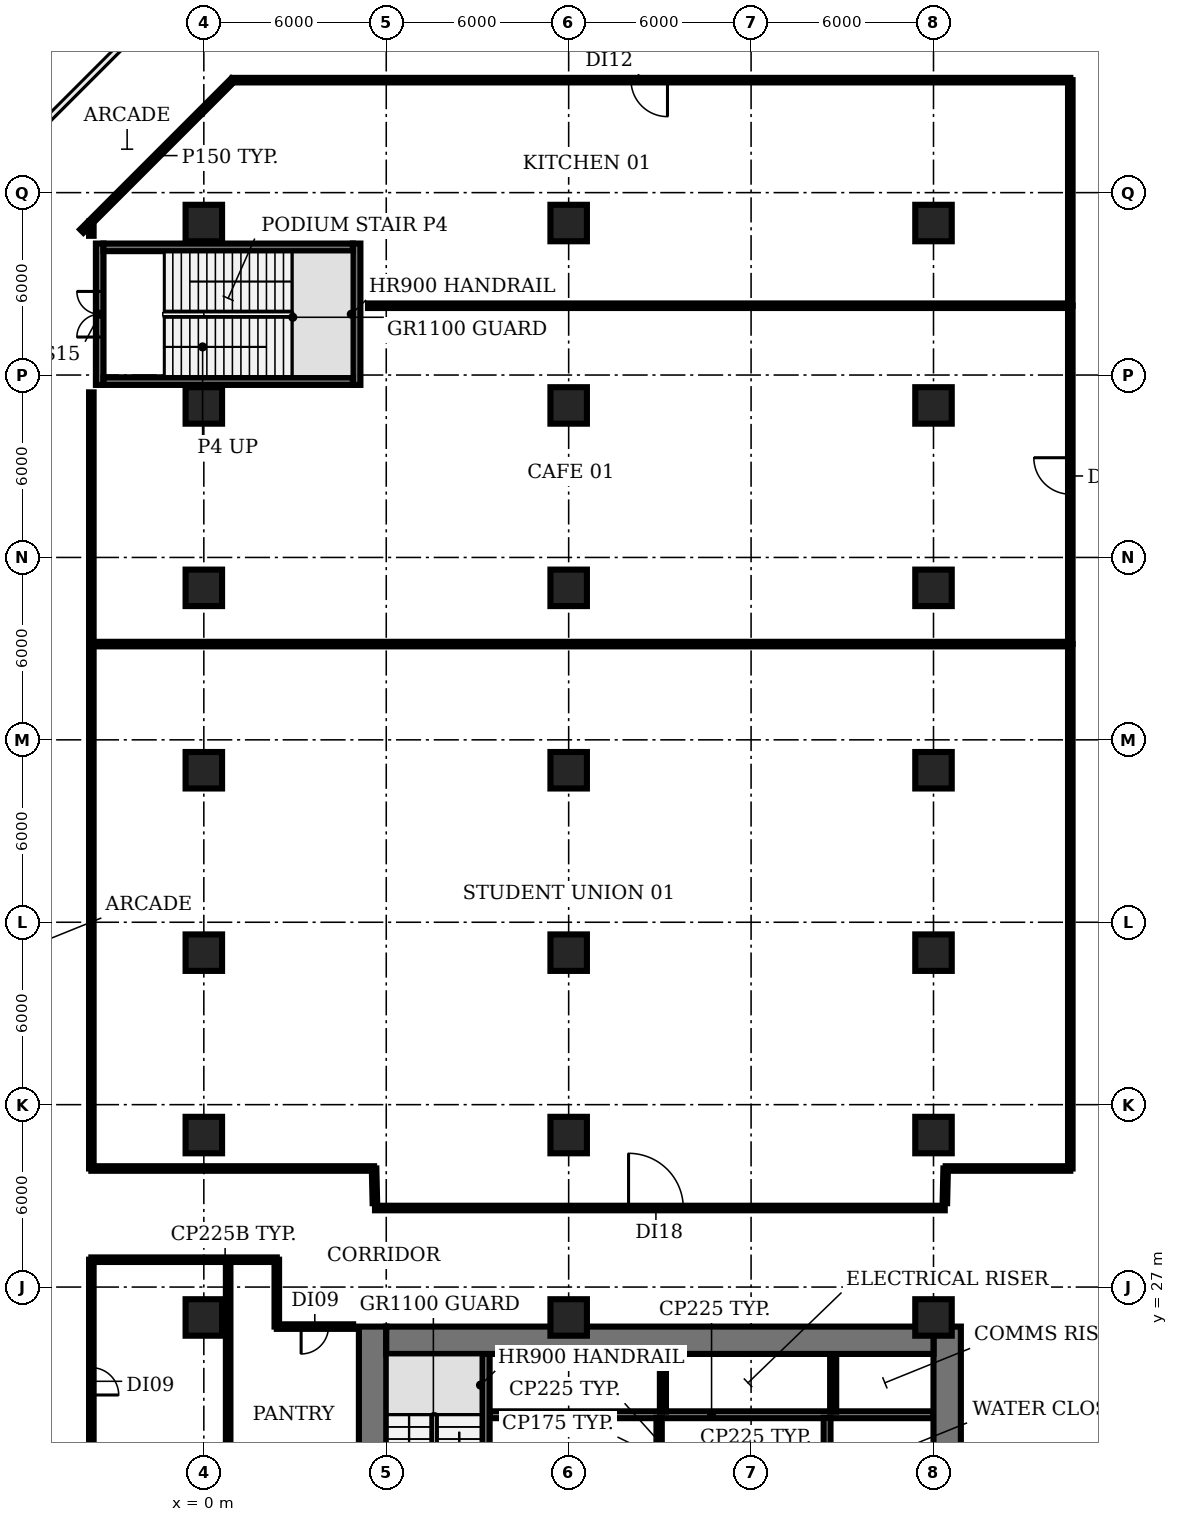
"""IFC4 building model, lengths in metres.
Left out: names, types, materials, properties, quantities, classifications, styles, units other than length and angle.
Written with IfcOpenShell. Run it as: python <this file> out.ifc"""

import sys

from ifc_helpers import new_model, si_unit, direction, frame, frame_2d, origin, origin_2d, place, context, subcontext, project, spatial, rectangle, extrude, element, fill, save


model = new_model("IFC4")
c1 = context("Model", 3, precision=1e-05, world=origin(), true_north=direction((0.0, 1.0)))
c2 = subcontext(c1, "Body", "Model", "MODEL_VIEW")
j1 = project(units=[si_unit("LENGTHUNIT", "METRE"), si_unit("PLANEANGLEUNIT", "RADIAN")], contexts=[c1])
p1 = place(None, origin())
s1 = spatial("IfcSite", under=j1, at=p1, CompositionType="ELEMENT")
p2 = place(p1, origin())
s2 = spatial("IfcBuilding", under=s1, at=p2, CompositionType="ELEMENT")
p3 = place(p2, origin())
s3 = spatial("IfcBuildingStorey", under=s2, at=p3, CompositionType="ELEMENT", Elevation=0.0)
for number, where, z_axis, x_axis in (
    (1, (0.0, 26.0, 0.0), (0.0, 0.0, 1.0), (1.0, 0.0, 0.0)),
    (2, (0.0, 32.0, 0.0), (0.0, 0.0, 1.0), (1.0, 0.0, 0.0)),
    (3, (0.0, 38.0, 0.0), (0.0, 0.0, 1.0), (1.0, 0.0, 0.0)),
    (4, (0.0, 44.0, 0.0), (0.0, 0.0, 1.0), (1.0, 0.0, 0.0)),
    (5, (0.0, 50.0, 0.0), (0.0, 0.0, 1.0), (1.0, 0.0, 0.0)),
    (6, (0.0, 56.0, 0.0), (0.0, 0.0, 1.0), (1.0, 0.0, 0.0)),
    (7, (0.0, 62.0, 0.0), (0.0, 0.0, 1.0), (1.0, 0.0, 0.0)),
    (8, (12.0, 26.0, 0.0), (0.0, 0.0, 1.0), (1.0, 0.0, 0.0)),
    (9, (12.0, 32.0, 0.0), (0.0, 0.0, 1.0), (1.0, 0.0, 0.0)),
    (10, (12.0, 38.0, 0.0), (0.0, 0.0, 1.0), (1.0, 0.0, 0.0)),
    (11, (12.0, 44.0, 0.0), (0.0, 0.0, 1.0), (1.0, 0.0, 0.0)),
    (12, (12.0, 50.0, 0.0), (0.0, 0.0, 1.0), (1.0, 0.0, 0.0)),
    (13, (12.0, 56.0, 0.0), (0.0, 0.0, 1.0), (1.0, 0.0, 0.0)),
    (14, (12.0, 62.0, 0.0), (0.0, 0.0, 1.0), (1.0, 0.0, 0.0)),
    (15, (24.0, 26.0, 0.0), (0.0, 0.0, 1.0), (1.0, 0.0, 0.0)),
    (16, (24.0, 32.0, 0.0), (0.0, 0.0, 1.0), (1.0, 0.0, 0.0)),
    (17, (24.0, 38.0, 0.0), (0.0, 0.0, 1.0), (1.0, 0.0, 0.0)),
    (18, (24.0, 44.0, 0.0), (0.0, 0.0, 1.0), (1.0, 0.0, 0.0)),
    (19, (24.0, 50.0, 0.0), (0.0, 0.0, 1.0), (1.0, 0.0, 0.0)),
    (20, (24.0, 56.0, 0.0), (0.0, 0.0, 1.0), (1.0, 0.0, 0.0)),
    (21, (24.0, 62.0, 0.0), (0.0, 0.0, 1.0), (1.0, 0.0, 0.0)),
):
    element("IfcColumn", number, at=place(p3, frame(where, z_axis=z_axis, x_axis=x_axis)), inside=s3, PredefinedType="COLUMN", context=c2, shape_type="SweptSolid", body=[
        extrude(rectangle(XDim=1.2, YDim=1.2, at=origin_2d()), origin(), (0.0, 0.0, 1.0), 5.65),
    ])
p4 = place(p3, frame((9.4, 22.8, 0.0), z_axis=(0.0, 0.0, 1.0), x_axis=(1.0, 0.0, 0.0)))
e22 = element("IfcWall", 22, at=p4, inside=s3, PredefinedType="PARTITIONING", context=c2, shape_type="SweptSolid", body=[
    extrude(rectangle(XDim=14.6, YDim=0.225, at=frame_2d((7.3, 0.0))), origin(), (0.0, 0.0, 1.0), 5.65),
])
p5 = place(p3, frame((9.275, 18.375, 0.0), z_axis=(0.0, 0.0, 1.0), x_axis=(0.0, 1.0, 0.0)))
e23 = element("IfcWall", 23, at=p5, inside=s3, PredefinedType="SHEAR", context=c2, shape_type="SweptSolid", body=[
    extrude(rectangle(XDim=6.425, YDim=0.25, at=frame_2d((3.212, 0.0))), origin(), (0.0, 0.0, 1.0), 5.65),
])
p6 = place(p3, frame((14.975, 20.1, 0.0), z_axis=(0.0, 0.0, 1.0), x_axis=(0.0, 1.0, 0.0)))
e24 = element("IfcWall", 24, at=p6, inside=s3, PredefinedType="PARTITIONING", context=c2, shape_type="SweptSolid", body=[
    extrude(rectangle(XDim=2.6, YDim=0.175, at=frame_2d((1.3, 0.0))), origin(), (0.0, 0.0, 1.0), 5.65),
])
p7 = place(p3, frame((15.1, 22.9, 0.0), z_axis=(0.0, 0.0, 1.0), x_axis=(0.0, 1.0, 0.0)))
e25 = element("IfcWall", 25, at=p7, inside=s3, PredefinedType="SHEAR", context=c2, shape_type="SweptSolid", body=[
    extrude(rectangle(XDim=1.9, YDim=0.2, at=frame_2d((0.95, 0.0))), origin(), (0.0, 0.0, 1.0), 5.65),
])
p8 = place(p3, frame((20.5, 20.1, 0.0), z_axis=(0.0, 0.0, 1.0), x_axis=(0.0, 1.0, 0.0)))
e26 = element("IfcWall", 26, at=p8, inside=s3, PredefinedType="PARTITIONING", context=c2, shape_type="SweptSolid", body=[
    extrude(rectangle(XDim=2.6, YDim=0.225, at=frame_2d((1.3, 0.0))), origin(), (0.0, 0.0, 1.0), 5.65),
])
p9 = place(p3, frame((20.7, 22.9, 0.0), z_axis=(0.0, 0.0, 1.0), x_axis=(0.0, 1.0, 0.0)))
e27 = element("IfcWall", 27, at=p9, inside=s3, PredefinedType="SHEAR", context=c2, shape_type="SweptSolid", body=[
    extrude(rectangle(XDim=1.9, YDim=0.2, at=frame_2d((0.95, 0.0))), origin(), (0.0, 0.0, 1.0), 5.65),
])
p10 = place(p3, frame((5.55, 4.5, 0.0), z_axis=(0.0, 0.0, 1.0), x_axis=(0.0, 1.0, 0.0)))
e28 = element("IfcWall", 28, at=p10, inside=s3, PredefinedType="SHEAR", context=c2, shape_type="SweptSolid", body=[
    extrude(rectangle(XDim=21.2, YDim=0.9, at=frame_2d((10.6, 0.0))), origin(), (0.0, 0.0, 1.0), 5.65),
])
p11 = place(p10, frame((7.6, 0.0, 0.0)))
e29 = element("IfcOpeningElement", 29, at=p11, cuts=e28, PredefinedType="OPENING", context=c2, shape_type="SweptSolid", body=[
    extrude(rectangle(XDim=1.2, YDim=2.1, at=frame_2d((0.6, 1.05))), frame((0.0, 0.46, 0.0), z_axis=(0.0, -1.0, 0.0), x_axis=(1.0, 0.0, 0.0)), (0.0, 0.0, 1.0), 0.92),
])
p12 = place(p10, frame((14.15, 0.0, 0.0)))
e30 = element("IfcOpeningElement", 30, at=p12, cuts=e28, PredefinedType="OPENING", context=c2, shape_type="SweptSolid", body=[
    extrude(rectangle(XDim=1.2, YDim=2.1, at=frame_2d((0.6, 1.05))), frame((0.0, 0.46, 0.0), z_axis=(0.0, -1.0, 0.0), x_axis=(1.0, 0.0, 0.0)), (0.0, 0.0, 1.0), 0.92),
])
p13 = place(p3, frame((24.45, 25.7, 0.0), z_axis=(0.0, 0.0, 1.0), x_axis=(0.0, -1.0, 0.0)))
e31 = element("IfcWall", 31, at=p13, inside=s3, PredefinedType="SHEAR", context=c2, shape_type="SweptSolid", body=[
    extrude(rectangle(XDim=21.2, YDim=0.9, at=frame_2d((10.6, 0.0))), origin(), (0.0, 0.0, 1.0), 5.65),
])
p14 = place(p13, frame((12.45, 0.0, 0.0)))
e32 = element("IfcOpeningElement", 32, at=p14, cuts=e31, PredefinedType="OPENING", context=c2, shape_type="SweptSolid", body=[
    extrude(rectangle(XDim=0.9, YDim=2.1, at=frame_2d((0.45, 1.05))), frame((0.0, 0.46, 0.0), z_axis=(0.0, -1.0, 0.0), x_axis=(1.0, 0.0, 0.0)), (0.0, 0.0, 1.0), 0.92),
])
p15 = place(p13, frame((6.45, 0.0, 0.0)))
e33 = element("IfcOpeningElement", 33, at=p15, cuts=e31, PredefinedType="OPENING", context=c2, shape_type="SweptSolid", body=[
    extrude(rectangle(XDim=2.0, YDim=2.1, at=frame_2d((1.0, 1.05))), frame((0.0, 0.46, 0.0), z_axis=(0.0, -1.0, 0.0), x_axis=(1.0, 0.0, 0.0)), (0.0, 0.0, 1.0), 0.92),
])
p16 = place(p3, frame((6.0, 25.25, 0.0), z_axis=(0.0, 0.0, 1.0), x_axis=(1.0, 0.0, 0.0)))
e34 = element("IfcWall", 34, at=p16, inside=s3, PredefinedType="SHEAR", context=c2, shape_type="SweptSolid", body=[
    extrude(rectangle(XDim=18.0, YDim=0.9, at=frame_2d((9.0, 0.0))), origin(), (0.0, 0.0, 1.0), 5.65),
])
p17 = place(p3, frame((-3.425, 56.675, 0.0), z_axis=(0.0, 0.0, 1.0), x_axis=(0.0, 1.0, 0.0)))
e35 = element("IfcWall", 35, at=p17, inside=s3, PredefinedType="SHEAR", context=c2, shape_type="SweptSolid", body=[
    extrude(rectangle(XDim=4.65, YDim=0.25, at=frame_2d((2.325, 0.0))), origin(), (0.0, 0.0, 1.0), 5.65),
])
p18 = place(p17, frame((1.575, 0.0, 0.0)))
e36 = element("IfcOpeningElement", 36, at=p18, cuts=e35, PredefinedType="OPENING", context=c2, shape_type="SweptSolid", body=[
    extrude(rectangle(XDim=1.5, YDim=2.1, at=frame_2d((0.75, 1.05))), frame((0.0, 0.135, 0.0), z_axis=(0.0, -1.0, 0.0), x_axis=(1.0, 0.0, 0.0)), (0.0, 0.0, 1.0), 0.27),
])
p19 = place(p3, frame((5.025, 56.675, 0.0), z_axis=(0.0, 0.0, 1.0), x_axis=(0.0, 1.0, 0.0)))
e37 = element("IfcWall", 37, at=p19, inside=s3, PredefinedType="SHEAR", context=c2, shape_type="SweptSolid", body=[
    extrude(rectangle(XDim=4.65, YDim=0.25, at=frame_2d((2.325, 0.0))), origin(), (0.0, 0.0, 1.0), 5.65),
])
for number, where, z_axis, x_axis in (
    (38, (-3.3, 56.8, 0.0), (0.0, 0.0, 1.0), (1.0, 0.0, 0.0)),
    (39, (-3.3, 61.2, 0.0), (0.0, 0.0, 1.0), (1.0, 0.0, 0.0)),
):
    element("IfcWall", number, at=place(p3, frame(where, z_axis=z_axis, x_axis=x_axis)), inside=s3, PredefinedType="SHEAR", context=c2, shape_type="SweptSolid", body=[
        extrude(rectangle(XDim=8.2, YDim=0.25, at=frame_2d((4.1, 0.0))), origin(), (0.0, 0.0, 1.0), 5.65),
    ])
p20 = place(p3, frame((-4.013, 61.737, 0.0), z_axis=(0.0, 0.0, 1.0), x_axis=(0.707106781187, 0.707106781187, 0.0)))
e40 = element("IfcWall", 40, at=p20, inside=s3, PredefinedType="PARTITIONING", context=c2, shape_type="SweptSolid", body=[
    extrude(rectangle(XDim=7.019, YDim=0.15, at=frame_2d((3.51, 0.0))), origin(), (0.0, 0.0, 1.0), 4.53),
])
p21 = place(p3, frame((-3.7, 27.9, 0.0), z_axis=(0.0, 0.0, 1.0), x_axis=(0.0, -1.0, 0.0)))
e41 = element("IfcWall", 41, at=p21, inside=s3, PredefinedType="PARTITIONING", context=c2, shape_type="SweptSolid", body=[
    extrude(rectangle(XDim=7.65, YDim=0.15, at=frame_2d((3.825, 0.0))), origin(), (0.0, 0.0, 1.0), 4.53),
])
p22 = place(p21, frame((3.55, 0.0, 0.0)))
e42 = element("IfcOpeningElement", 42, at=p22, cuts=e41, PredefinedType="OPENING", context=c2, shape_type="SweptSolid", body=[
    extrude(rectangle(XDim=0.9, YDim=2.1, at=frame_2d((0.45, 1.05))), frame((0.0, 0.085, 0.0), z_axis=(0.0, -1.0, 0.0), x_axis=(1.0, 0.0, 0.0)), (0.0, 0.0, 1.0), 0.17),
])
p23 = place(p3, frame((-3.7, 27.9, 0.0), z_axis=(0.0, 0.0, 1.0), x_axis=(1.0, 0.0, 0.0)))
e43 = element("IfcWall", 43, at=p23, inside=s3, PredefinedType="PARTITIONING", context=c2, shape_type="SweptSolid", body=[
    extrude(rectangle(XDim=6.1, YDim=0.15, at=frame_2d((3.05, 0.0))), origin(), (0.0, 0.0, 1.0), 4.53),
])
p24 = place(p3, frame((-3.7, 30.9, 0.0), z_axis=(0.0, 0.0, 1.0), x_axis=(0.0, 1.0, 0.0)))
e44 = element("IfcWall", 44, at=p24, inside=s3, PredefinedType="PARTITIONING", context=c2, shape_type="SweptSolid", body=[
    extrude(rectangle(XDim=25.53, YDim=0.15, at=frame_2d((12.765, 0.0))), origin(), (0.0, 0.0, 1.0), 4.53),
])
p25 = place(p3, frame((-3.7, 30.9, 0.0), z_axis=(0.0, 0.0, 1.0), x_axis=(1.0, 0.0, 0.0)))
e45 = element("IfcWall", 45, at=p25, inside=s3, PredefinedType="PARTITIONING", context=c2, shape_type="SweptSolid", body=[
    extrude(rectangle(XDim=9.3, YDim=0.15, at=frame_2d((4.65, 0.0))), origin(), (0.0, 0.0, 1.0), 4.53),
])
p26 = place(p3, frame((-3.7, 48.15, 0.0), z_axis=(0.0, 0.0, 1.0), x_axis=(1.0, 0.0, 0.0)))
e46 = element("IfcWall", 46, at=p26, inside=s3, PredefinedType="PARTITIONING", context=c2, shape_type="SweptSolid", body=[
    extrude(rectangle(XDim=32.2, YDim=0.15, at=frame_2d((16.1, 0.0))), origin(), (0.0, 0.0, 1.0), 4.53),
])
p27 = place(p3, frame((-3.7, 61.58, 0.0), z_axis=(0.0, 0.0, 1.0), x_axis=(0.0, 1.0, 0.0)))
e47 = element("IfcWall", 47, at=p27, inside=s3, PredefinedType="PARTITIONING", context=c2, shape_type="SweptSolid", body=[
    extrude(rectangle(XDim=0.47, YDim=0.15, at=frame_2d((0.235, 0.0))), origin(), (0.0, 0.0, 1.0), 4.53),
])
p28 = place(p3, frame((0.8, 20.25, 0.0), z_axis=(0.0, 0.0, 1.0), x_axis=(0.0, 1.0, 0.0)))
e48 = element("IfcWall", 48, at=p28, inside=s3, PredefinedType="PARTITIONING", context=c2, shape_type="SweptSolid", body=[
    extrude(rectangle(XDim=7.65, YDim=0.15, at=frame_2d((3.825, 0.0))), origin(), (0.0, 0.0, 1.0), 4.53),
])
p29 = place(p3, frame((2.4, 25.7, 0.0), z_axis=(0.0, 0.0, 1.0), x_axis=(0.0, 1.0, 0.0)))
e49 = element("IfcWall", 49, at=p29, inside=s3, PredefinedType="PARTITIONING", context=c2, shape_type="SweptSolid", body=[
    extrude(rectangle(XDim=2.2, YDim=0.15, at=frame_2d((1.1, 0.0))), origin(), (0.0, 0.0, 1.0), 4.53),
])
p30 = place(p3, frame((4.91, 25.7, 0.0), z_axis=(0.0, 0.0, 1.0), x_axis=(-1.0, 0.0, 0.0)))
e50 = element("IfcWall", 50, at=p30, inside=s3, PredefinedType="PARTITIONING", context=c2, shape_type="SweptSolid", body=[
    extrude(rectangle(XDim=2.51, YDim=0.15, at=frame_2d((1.255, 0.0))), origin(), (0.0, 0.0, 1.0), 4.53),
])
p31 = place(p30, frame((0.81, 0.0, 0.0)))
e51 = element("IfcOpeningElement", 51, at=p31, cuts=e50, PredefinedType="OPENING", context=c2, shape_type="SweptSolid", body=[
    extrude(rectangle(XDim=0.9, YDim=2.1, at=frame_2d((0.45, 1.05))), frame((0.0, 0.085, 0.0), z_axis=(0.0, -1.0, 0.0), x_axis=(1.0, 0.0, 0.0)), (0.0, 0.0, 1.0), 0.17),
])
p32 = place(p3, frame((5.4, 59.28, 0.0), z_axis=(0.0, 0.0, 1.0), x_axis=(1.0, 0.0, 0.0)))
e52 = element("IfcWall", 52, at=p32, inside=s3, PredefinedType="PARTITIONING", context=c2, shape_type="SweptSolid", body=[
    extrude(rectangle(XDim=23.1, YDim=0.15, at=frame_2d((11.55, 0.0))), origin(), (0.0, 0.0, 1.0), 4.53),
])
p33 = place(p3, frame((5.6, 30.9, 0.0), z_axis=(0.0, 0.0, 1.0), x_axis=(0.022906193834, -0.99973761872, 0.0)))
e53 = element("IfcWall", 53, at=p33, inside=s3, PredefinedType="PARTITIONING", context=c2, shape_type="SweptSolid", body=[
    extrude(rectangle(XDim=1.14, YDim=0.15, at=frame_2d((0.57, 0.0))), origin(), (0.0, 0.0, 1.0), 4.53),
])
p34 = place(p3, frame((5.63, 29.6, 0.0), z_axis=(0.0, 0.0, 1.0), x_axis=(1.0, 0.0, 0.0)))
e54 = element("IfcWall", 54, at=p34, inside=s3, PredefinedType="PARTITIONING", context=c2, shape_type="SweptSolid", body=[
    extrude(rectangle(XDim=18.74, YDim=0.15, at=frame_2d((9.37, 0.0))), origin(), (0.0, 0.0, 1.0), 4.53),
])
p35 = place(p34, frame((8.34, 0.0, 0.0)))
e55 = element("IfcOpeningElement", 55, at=p35, cuts=e54, PredefinedType="OPENING", context=c2, shape_type="SweptSolid", body=[
    extrude(rectangle(XDim=1.8, YDim=2.1, at=frame_2d((0.9, 1.05))), frame((0.0, 0.085, 0.0), z_axis=(0.0, -1.0, 0.0), x_axis=(1.0, 0.0, 0.0)), (0.0, 0.0, 1.0), 0.17),
])
p36 = place(p3, frame((24.374, 29.76, 0.0), z_axis=(0.0, 0.0, 1.0), x_axis=(0.022906193834, 0.99973761872, 0.0)))
e56 = element("IfcWall", 56, at=p36, inside=s3, PredefinedType="PARTITIONING", context=c2, shape_type="SweptSolid", body=[
    extrude(rectangle(XDim=1.14, YDim=0.15, at=frame_2d((0.57, 0.0))), origin(), (0.0, 0.0, 1.0), 4.53),
])
p37 = place(p3, frame((24.4, 30.9, 0.0), z_axis=(0.0, 0.0, 1.0), x_axis=(1.0, 0.0, 0.0)))
e57 = element("IfcWall", 57, at=p37, inside=s3, PredefinedType="PARTITIONING", context=c2, shape_type="SweptSolid", body=[
    extrude(rectangle(XDim=4.1, YDim=0.15, at=frame_2d((2.05, 0.0))), origin(), (0.0, 0.0, 1.0), 4.53),
])
p38 = place(p3, frame((28.5, 30.9, 0.0), z_axis=(0.0, 0.0, 1.0), x_axis=(0.0, 1.0, 0.0)))
e58 = element("IfcWall", 58, at=p38, inside=s3, PredefinedType="PARTITIONING", context=c2, shape_type="SweptSolid", body=[
    extrude(rectangle(XDim=17.25, YDim=0.15, at=frame_2d((8.625, 0.0))), origin(), (0.0, 0.0, 1.0), 4.53),
])
p39 = place(p3, frame((28.5, 48.15, 0.0), z_axis=(0.0, 0.0, 1.0), x_axis=(0.0, 1.0, 0.0)))
e59 = element("IfcWall", 59, at=p39, inside=s3, PredefinedType="PARTITIONING", context=c2, shape_type="SweptSolid", body=[
    extrude(rectangle(XDim=11.13, YDim=0.15, at=frame_2d((5.565, 0.0))), origin(), (0.0, 0.0, 1.0), 4.53),
])
p40 = place(p39, frame((4.93, 0.0, 0.0)))
e60 = element("IfcOpeningElement", 60, at=p40, cuts=e59, PredefinedType="OPENING", context=c2, shape_type="SweptSolid", body=[
    extrude(rectangle(XDim=1.2, YDim=2.1, at=frame_2d((0.6, 1.05))), frame((0.0, 0.085, 0.0), z_axis=(0.0, -1.0, 0.0), x_axis=(1.0, 0.0, 0.0)), (0.0, 0.0, 1.0), 0.17),
])
p41 = place(p3, frame((28.5, 59.28, 0.0), z_axis=(0.0, 0.0, 1.0), x_axis=(0.0, 1.0, 0.0)))
e61 = element("IfcWall", 61, at=p41, inside=s3, PredefinedType="PARTITIONING", context=c2, shape_type="SweptSolid", body=[
    extrude(rectangle(XDim=7.42, YDim=0.15, at=frame_2d((3.71, 0.0))), origin(), (0.0, 0.0, 1.0), 4.53),
])
p42 = place(p3, frame((28.5, 66.7, 0.0), z_axis=(0.0, 0.0, 1.0), x_axis=(-1.0, 0.0, 0.0)))
e62 = element("IfcWall", 62, at=p42, inside=s3, PredefinedType="PARTITIONING", context=c2, shape_type="SweptSolid", body=[
    extrude(rectangle(XDim=27.55, YDim=0.15, at=frame_2d((13.775, 0.0))), origin(), (0.0, 0.0, 1.0), 4.53),
])
p43 = place(p42, frame((13.25, 0.0, 0.0)))
e63 = element("IfcOpeningElement", 63, at=p43, cuts=e62, PredefinedType="OPENING", context=c2, shape_type="SweptSolid", body=[
    extrude(rectangle(XDim=1.2, YDim=2.1, at=frame_2d((0.6, 1.05))), frame((0.0, 0.085, 0.0), z_axis=(0.0, -1.0, 0.0), x_axis=(1.0, 0.0, 0.0)), (0.0, 0.0, 1.0), 0.17),
])
p44 = place(p18, origin())
e64 = element("IfcDoor", 64, at=p44, inside=s3, OperationType="DOUBLE_DOOR_SINGLE_SWING", PredefinedType="DOOR", context=c2, shape_type="SweptSolid", body=[
    extrude(rectangle(XDim=1.5, YDim=2.1, at=frame_2d((0.75, 1.05))), frame((0.0, 0.025, 0.0), z_axis=(0.0, -1.0, 0.0), x_axis=(1.0, 0.0, 0.0)), (0.0, 0.0, 1.0), 0.05),
])
fill(e36, e64)
p45 = place(p22, origin())
e65 = element("IfcDoor", 65, at=p45, inside=s3, OperationType="SINGLE_SWING_RIGHT", PredefinedType="DOOR", context=c2, shape_type="SweptSolid", body=[
    extrude(rectangle(XDim=0.9, YDim=2.1, at=frame_2d((0.45, 1.05))), frame((0.0, 0.025, 0.0), z_axis=(0.0, -1.0, 0.0), x_axis=(1.0, 0.0, 0.0)), (0.0, 0.0, 1.0), 0.05),
])
fill(e42, e65)
p46 = place(p31, origin())
e66 = element("IfcDoor", 66, at=p46, inside=s3, OperationType="SINGLE_SWING_RIGHT", PredefinedType="DOOR", context=c2, shape_type="SweptSolid", body=[
    extrude(rectangle(XDim=0.9, YDim=2.1, at=frame_2d((0.45, 1.05))), frame((0.0, 0.025, 0.0), z_axis=(0.0, -1.0, 0.0), x_axis=(1.0, 0.0, 0.0)), (0.0, 0.0, 1.0), 0.05),
])
fill(e51, e66)
p47 = place(p35, origin())
e67 = element("IfcDoor", 67, at=p47, inside=s3, OperationType="SINGLE_SWING_LEFT", PredefinedType="DOOR", context=c2, shape_type="SweptSolid", body=[
    extrude(rectangle(XDim=1.8, YDim=2.1, at=frame_2d((0.9, 1.05))), frame((0.0, 0.025, 0.0), z_axis=(0.0, -1.0, 0.0), x_axis=(1.0, 0.0, 0.0)), (0.0, 0.0, 1.0), 0.05),
])
fill(e55, e67)
p48 = place(p40, origin())
e68 = element("IfcDoor", 68, at=p48, inside=s3, OperationType="SINGLE_SWING_RIGHT", PredefinedType="DOOR", context=c2, shape_type="SweptSolid", body=[
    extrude(rectangle(XDim=1.2, YDim=2.1, at=frame_2d((0.6, 1.05))), frame((0.0, 0.025, 0.0), z_axis=(0.0, -1.0, 0.0), x_axis=(1.0, 0.0, 0.0)), (0.0, 0.0, 1.0), 0.05),
])
fill(e60, e68)
p49 = place(p43, origin())
e69 = element("IfcDoor", 69, at=p49, inside=s3, OperationType="SINGLE_SWING_LEFT", PredefinedType="DOOR", context=c2, shape_type="SweptSolid", body=[
    extrude(rectangle(XDim=1.2, YDim=2.1, at=frame_2d((0.6, 1.05))), frame((0.0, 0.025, 0.0), z_axis=(0.0, -1.0, 0.0), x_axis=(1.0, 0.0, 0.0)), (0.0, 0.0, 1.0), 0.05),
])
fill(e63, e69)
save(model, sys.argv[1])
